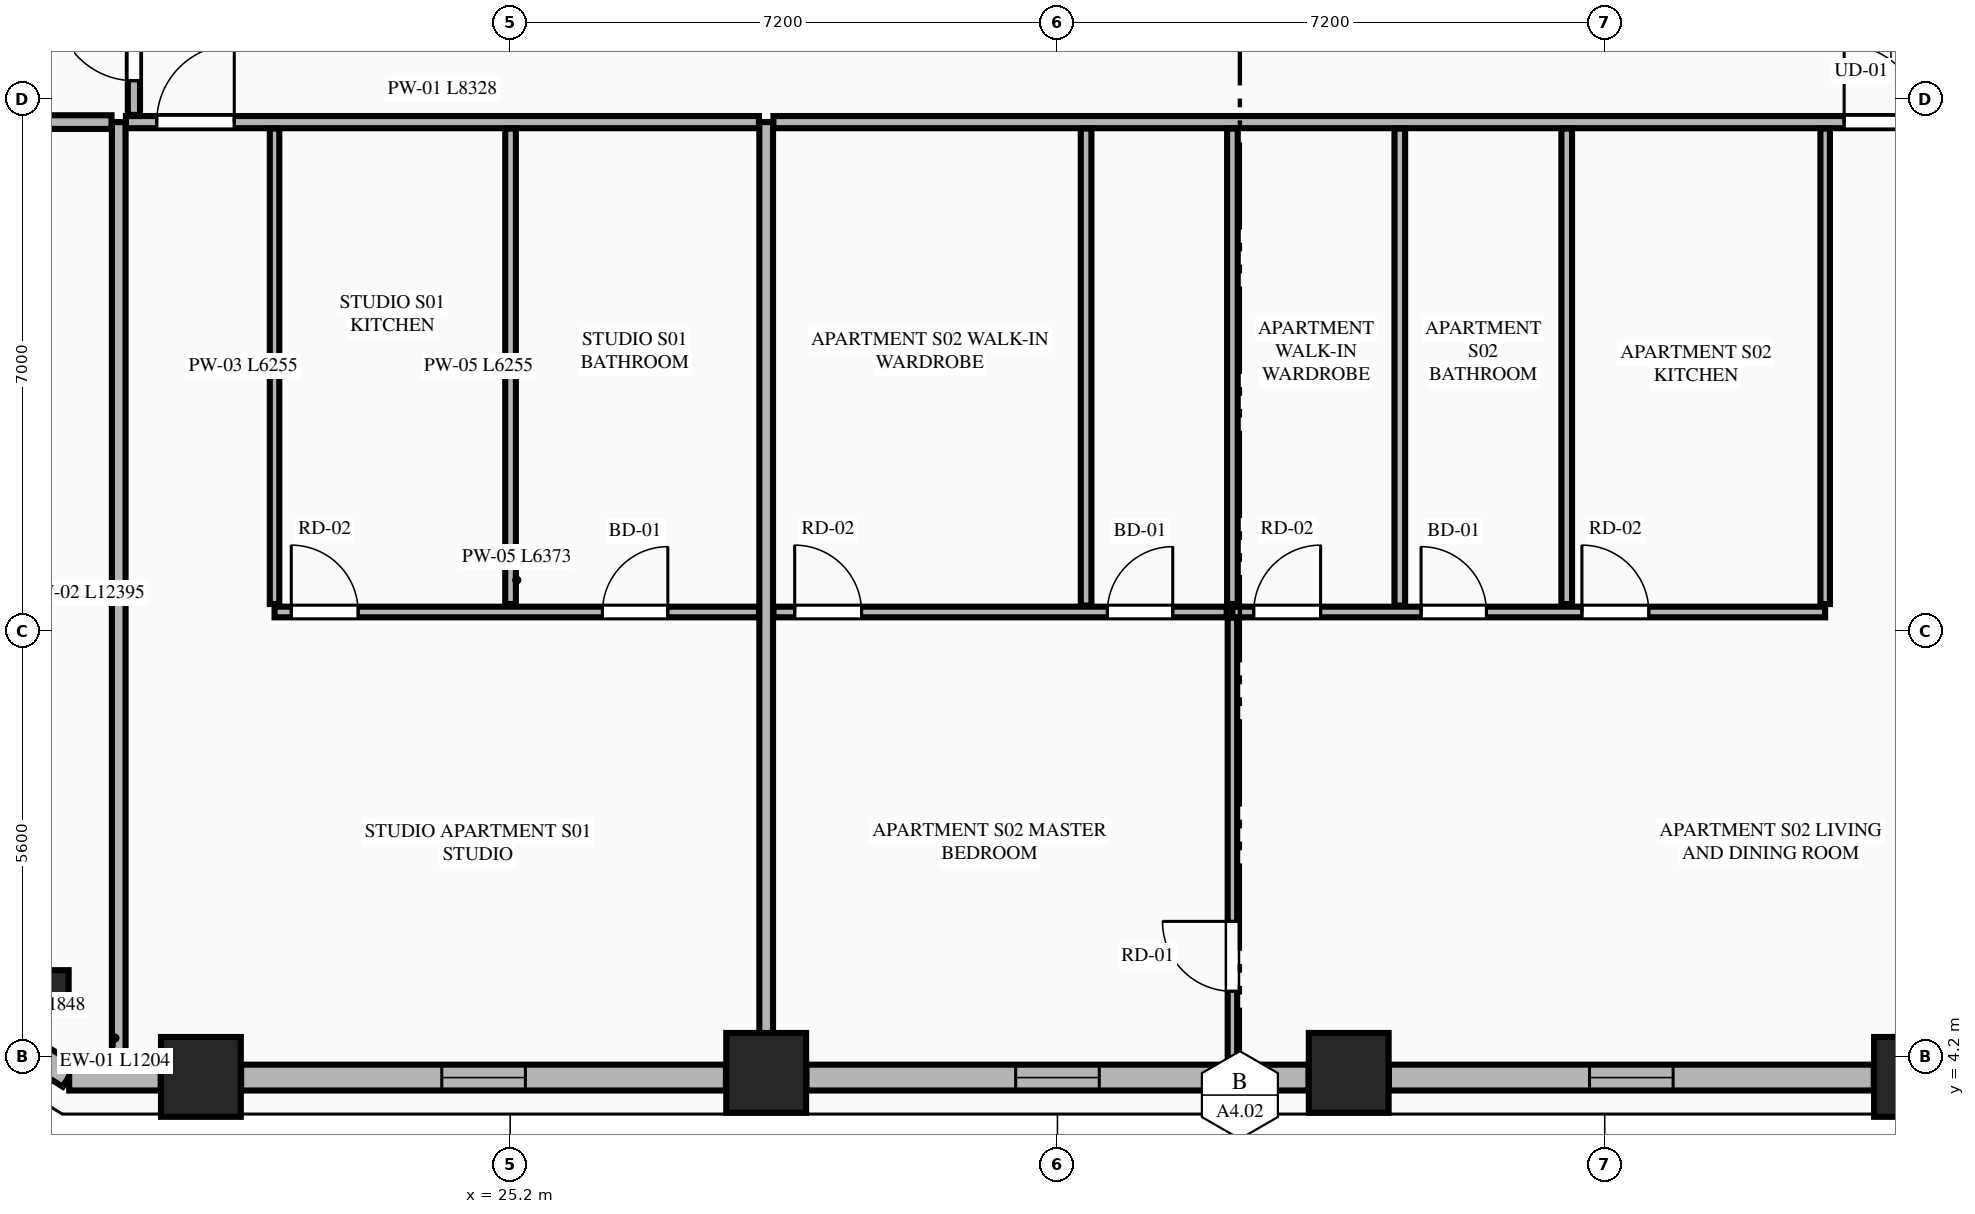
"""IFC4 building model, lengths in metres.
Left out: names, types, materials, properties, quantities, classifications, styles, units other than length and angle.
Written with IfcOpenShell. Run it as: python <this file> out.ifc"""

import sys

from ifc_helpers import new_model, si_unit, direction, frame, frame_2d, origin, origin_2d, place, context, subcontext, project, spatial, rectangle, extrude, element, fill, save


model = new_model("IFC4")
c1 = context("Model", 3, precision=1e-05, world=origin(), true_north=direction((0.0, 1.0)))
c2 = subcontext(c1, "Body", "Model", "MODEL_VIEW")
j1 = project(units=[si_unit("LENGTHUNIT", "METRE"), si_unit("PLANEANGLEUNIT", "RADIAN")], contexts=[c1])
p1 = place(None, origin())
s1 = spatial("IfcSite", under=j1, at=p1, CompositionType="ELEMENT")
p2 = place(p1, origin())
s2 = spatial("IfcBuilding", under=s1, at=p2, CompositionType="ELEMENT")
p3 = place(p2, frame((0.0, 0.0, 126.8)))
s3 = spatial("IfcBuildingStorey", under=s2, at=p3, CompositionType="ELEMENT", Elevation=126.8)
for number, where, z_axis, x_axis in (
    (1, (21.131, 3.939, 0.0), (0.0, 0.0, 1.0), (1.0, 0.0, 0.0)),
    (2, (28.568, 3.992, 0.0), (0.0, 0.0, 1.0), (1.0, 0.0, 0.0)),
    (3, (36.232, 3.992, 0.0), (0.0, 0.0, 1.0), (1.0, 0.0, 0.0)),
    (4, (43.669, 3.939, 0.0), (0.0, 0.0, 1.0), (1.0, 0.0, 0.0)),
):
    element("IfcColumn", number, at=place(p3, frame(where, z_axis=z_axis, x_axis=x_axis)), inside=s3, PredefinedType="COLUMN", context=c2, shape_type="SweptSolid", body=[
        extrude(rectangle(XDim=1.05, YDim=1.05, at=origin_2d()), origin(), (0.0, 0.0, 1.0), 3.55),
    ])
p4 = place(p3, frame((19.141, 5.093, 0.0), z_axis=(0.0, 0.0, 1.0), x_axis=(0.865160173452, -0.501495637342, 0.0)))
e5 = element("IfcColumn", 5, at=p4, inside=s3, PredefinedType="PILASTER", context=c2, shape_type="SweptSolid", body=[
    extrude(rectangle(XDim=0.5, YDim=0.35, at=origin_2d()), origin(), (0.0, 0.0, 1.0), 3.55),
])
p5 = place(p3, frame((17.829, 4.923, 0.0), z_axis=(0.0, 0.0, 1.0), x_axis=(0.851798915137, -0.523868884523, 0.0)))
e6 = element("IfcWall", 6, at=p5, inside=s3, PredefinedType="STANDARD", context=c2, shape_type="SweptSolid", body=[
    extrude(rectangle(XDim=1.848, YDim=0.34, at=frame_2d((0.924, 0.0))), origin(), (0.0, 0.0, 1.0), 3.34),
])
p6 = place(p3, frame((19.398, 3.93, 0.0), z_axis=(0.0, 0.0, 1.0), x_axis=(1.0, 0.0, 0.0)))
e7 = element("IfcWall", 7, at=p6, inside=s3, PredefinedType="STANDARD", context=c2, shape_type="SweptSolid", body=[
    extrude(rectangle(XDim=1.204, YDim=0.34, at=frame_2d((0.602, 0.0))), origin(), (0.0, 0.0, 1.0), 3.34),
])
p7 = place(p3, frame((21.66, 3.93, 0.0), z_axis=(0.0, 0.0, 1.0), x_axis=(1.0, 0.0, 0.0)))
e8 = element("IfcWall", 8, at=p7, inside=s3, PredefinedType="STANDARD", context=c2, shape_type="SweptSolid", body=[
    extrude(rectangle(XDim=6.379, YDim=0.34, at=frame_2d((3.189, 0.0))), origin(), (0.0, 0.0, 1.0), 2.797),
])
p8 = place(p7, frame((2.64, 0.0, 0.75)))
e9 = element("IfcOpeningElement", 9, at=p8, cuts=e8, PredefinedType="OPENING", context=c2, shape_type="SweptSolid", body=[
    extrude(rectangle(XDim=1.1, YDim=1.897, at=frame_2d((0.55, 0.948))), frame((0.0, 0.18, 0.0), z_axis=(0.0, -1.0, 0.0), x_axis=(1.0, 0.0, 0.0)), (0.0, 0.0, 1.0), 0.36),
])
p9 = place(p3, frame((29.097, 3.93, 0.0), z_axis=(0.0, 0.0, 1.0), x_axis=(1.0, 0.0, 0.0)))
e10 = element("IfcWall", 10, at=p9, inside=s3, PredefinedType="STANDARD", context=c2, shape_type="SweptSolid", body=[
    extrude(rectangle(XDim=6.606, YDim=0.34, at=frame_2d((3.303, 0.0))), origin(), (0.0, 0.0, 1.0), 2.797),
])
p10 = place(p9, frame((2.753, 0.0, 0.75)))
e11 = element("IfcOpeningElement", 11, at=p10, cuts=e10, PredefinedType="OPENING", context=c2, shape_type="SweptSolid", body=[
    extrude(rectangle(XDim=1.1, YDim=1.897, at=frame_2d((0.55, 0.948))), frame((0.0, 0.18, 0.0), z_axis=(0.0, -1.0, 0.0), x_axis=(1.0, 0.0, 0.0)), (0.0, 0.0, 1.0), 0.36),
])
p11 = place(p3, frame((36.761, 3.93, 0.0), z_axis=(0.0, 0.0, 1.0), x_axis=(1.0, 0.0, 0.0)))
e12 = element("IfcWall", 12, at=p11, inside=s3, PredefinedType="STANDARD", context=c2, shape_type="SweptSolid", body=[
    extrude(rectangle(XDim=6.379, YDim=0.34, at=frame_2d((3.189, 0.0))), origin(), (0.0, 0.0, 1.0), 2.797),
])
p12 = place(p11, frame((2.639, 0.0, 0.75)))
e13 = element("IfcOpeningElement", 13, at=p12, cuts=e12, PredefinedType="OPENING", context=c2, shape_type="SweptSolid", body=[
    extrude(rectangle(XDim=1.1, YDim=1.897, at=frame_2d((0.55, 0.948))), frame((0.0, 0.18, 0.0), z_axis=(0.0, -1.0, 0.0), x_axis=(1.0, 0.0, 0.0)), (0.0, 0.0, 1.0), 0.36),
])
p13 = place(p3, frame((20.05, 4.105, 0.0), z_axis=(0.0, 0.0, 1.0), x_axis=(0.0, 1.0, 0.0)))
e14 = element("IfcWall", 14, at=p13, inside=s3, PredefinedType="PARTITIONING", context=c2, shape_type="SweptSolid", body=[
    extrude(rectangle(XDim=12.395, YDim=0.18, at=frame_2d((6.198, 0.0))), origin(), (0.0, 0.0, 1.0), 3.34),
])
p14 = place(p3, frame((28.568, 4.105, 0.0), z_axis=(0.0, 0.0, 1.0), x_axis=(0.0, 1.0, 0.0)))
e15 = element("IfcWall", 15, at=p14, inside=s3, PredefinedType="PARTITIONING", context=c2, shape_type="SweptSolid", body=[
    extrude(rectangle(XDim=12.395, YDim=0.18, at=frame_2d((6.198, 0.0))), origin(), (0.0, 0.0, 1.0), 2.722),
])
p15 = place(p3, frame((20.145, 16.5, 0.0), z_axis=(0.0, 0.0, 1.0), x_axis=(1.0, 0.0, 0.0)))
e16 = element("IfcWall", 16, at=p15, inside=s3, PredefinedType="PARTITIONING", context=c2, shape_type="SweptSolid", body=[
    extrude(rectangle(XDim=8.328, YDim=0.16, at=frame_2d((4.164, 0.0))), origin(), (0.0, 0.0, 1.0), 3.34),
])
p16 = place(p15, frame((0.405, 0.0, 0.0)))
e17 = element("IfcOpeningElement", 17, at=p16, cuts=e16, PredefinedType="OPENING", context=c2, shape_type="SweptSolid", body=[
    extrude(rectangle(XDim=1.02, YDim=2.25, at=frame_2d((0.51, 1.125))), frame((0.0, 0.09, 0.0), z_axis=(0.0, -1.0, 0.0), x_axis=(1.0, 0.0, 0.0)), (0.0, 0.0, 1.0), 0.18),
])
p17 = place(p3, frame((22.1, 10.16, 0.0), z_axis=(0.0, 0.0, 1.0), x_axis=(0.0, 1.0, 0.0)))
e18 = element("IfcWall", 18, at=p17, inside=s3, PredefinedType="PARTITIONING", context=c2, shape_type="SweptSolid", body=[
    extrude(rectangle(XDim=6.255, YDim=0.125, at=frame_2d((3.127, 0.0))), origin(), (0.0, 0.0, 1.0), 2.722),
])
p18 = place(p3, frame((22.1, 10.055, 0.0), z_axis=(0.0, 0.0, 1.0), x_axis=(1.0, 0.0, 0.0)))
e19 = element("IfcWall", 19, at=p18, inside=s3, PredefinedType="PLUMBINGWALL", context=c2, shape_type="SweptSolid", body=[
    extrude(rectangle(XDim=6.373, YDim=0.14, at=frame_2d((3.187, 0.0))), origin(), (0.0, 0.0, 1.0), 3.34),
])
p19 = place(p18, frame((4.314, 0.0, 0.0)))
e20 = element("IfcOpeningElement", 20, at=p19, cuts=e19, PredefinedType="OPENING", context=c2, shape_type="SweptSolid", body=[
    extrude(rectangle(XDim=0.86, YDim=2.1, at=frame_2d((0.43, 1.05))), frame((0.0, 0.08, 0.0), z_axis=(0.0, -1.0, 0.0), x_axis=(1.0, 0.0, 0.0)), (0.0, 0.0, 1.0), 0.16),
])
p20 = place(p18, frame((0.22, 0.0, 0.0)))
e21 = element("IfcOpeningElement", 21, at=p20, cuts=e19, PredefinedType="OPENING", context=c2, shape_type="SweptSolid", body=[
    extrude(rectangle(XDim=0.88, YDim=2.15, at=frame_2d((0.44, 1.075))), frame((0.0, 0.08, 0.0), z_axis=(0.0, -1.0, 0.0), x_axis=(1.0, 0.0, 0.0)), (0.0, 0.0, 1.0), 0.16),
])
p21 = place(p3, frame((25.205, 10.16, 0.0), z_axis=(0.0, 0.0, 1.0), x_axis=(0.0, 1.0, 0.0)))
e22 = element("IfcWall", 22, at=p21, inside=s3, PredefinedType="PLUMBINGWALL", context=c2, shape_type="SweptSolid", body=[
    extrude(rectangle(XDim=6.255, YDim=0.14, at=frame_2d((3.127, 0.0))), origin(), (0.0, 0.0, 1.0), 3.34),
])
p22 = place(p3, frame((28.663, 16.5, 0.0), z_axis=(0.0, 0.0, 1.0), x_axis=(1.0, 0.0, 0.0)))
e23 = element("IfcWall", 23, at=p22, inside=s3, PredefinedType="PARTITIONING", context=c2, shape_type="SweptSolid", body=[
    extrude(rectangle(XDim=15.992, YDim=0.16, at=frame_2d((7.996, 0.0))), origin(), (0.0, 0.0, 1.0), 3.34),
])
p23 = place(p22, frame((14.087, 0.0, 0.0)))
e24 = element("IfcOpeningElement", 24, at=p23, cuts=e23, PredefinedType="OPENING", context=c2, shape_type="SweptSolid", body=[
    extrude(rectangle(XDim=1.02, YDim=2.25, at=frame_2d((0.51, 1.125))), frame((0.0, 0.09, 0.0), z_axis=(0.0, -1.0, 0.0), x_axis=(1.0, 0.0, 0.0)), (0.0, 0.0, 1.0), 0.18),
])
p24 = place(p3, frame((42.5, 10.16, 0.0), z_axis=(0.0, 0.0, 1.0), x_axis=(0.0, 1.0, 0.0)))
e25 = element("IfcWall", 25, at=p24, inside=s3, PredefinedType="PARTITIONING", context=c2, shape_type="SweptSolid", body=[
    extrude(rectangle(XDim=6.255, YDim=0.125, at=frame_2d((3.127, 0.0))), origin(), (0.0, 0.0, 1.0), 2.722),
])
p25 = place(p3, frame((34.702, 10.055, 0.0), z_axis=(0.0, 0.0, 1.0), x_axis=(1.0, 0.0, 0.0)))
e26 = element("IfcWall", 26, at=p25, inside=s3, PredefinedType="PLUMBINGWALL", context=c2, shape_type="SweptSolid", body=[
    extrude(rectangle(XDim=7.798, YDim=0.14, at=frame_2d((3.899, 0.0))), origin(), (0.0, 0.0, 1.0), 3.34),
])
p26 = place(p25, frame((0.28, 0.0, 0.0)))
e27 = element("IfcOpeningElement", 27, at=p26, cuts=e26, PredefinedType="OPENING", context=c2, shape_type="SweptSolid", body=[
    extrude(rectangle(XDim=0.88, YDim=2.15, at=frame_2d((0.44, 1.075))), frame((0.0, 0.08, 0.0), z_axis=(0.0, -1.0, 0.0), x_axis=(1.0, 0.0, 0.0)), (0.0, 0.0, 1.0), 0.16),
])
p27 = place(p25, frame((2.482, 0.0, 0.0)))
e28 = element("IfcOpeningElement", 28, at=p27, cuts=e26, PredefinedType="OPENING", context=c2, shape_type="SweptSolid", body=[
    extrude(rectangle(XDim=0.86, YDim=2.1, at=frame_2d((0.43, 1.05))), frame((0.0, 0.08, 0.0), z_axis=(0.0, -1.0, 0.0), x_axis=(1.0, 0.0, 0.0)), (0.0, 0.0, 1.0), 0.16),
])
p28 = place(p25, frame((4.598, 0.0, 0.0)))
e29 = element("IfcOpeningElement", 29, at=p28, cuts=e26, PredefinedType="OPENING", context=c2, shape_type="SweptSolid", body=[
    extrude(rectangle(XDim=0.88, YDim=2.15, at=frame_2d((0.44, 1.075))), frame((0.0, 0.08, 0.0), z_axis=(0.0, -1.0, 0.0), x_axis=(1.0, 0.0, 0.0)), (0.0, 0.0, 1.0), 0.16),
])
p29 = place(p3, frame((28.663, 10.055, 0.0), z_axis=(0.0, 0.0, 1.0), x_axis=(1.0, 0.0, 0.0)))
e30 = element("IfcWall", 30, at=p29, inside=s3, PredefinedType="PLUMBINGWALL", context=c2, shape_type="SweptSolid", body=[
    extrude(rectangle(XDim=5.964, YDim=0.14, at=frame_2d((2.982, 0.0))), origin(), (0.0, 0.0, 1.0), 3.34),
])
p30 = place(p29, frame((0.28, 0.0, 0.0)))
e31 = element("IfcOpeningElement", 31, at=p30, cuts=e30, PredefinedType="OPENING", context=c2, shape_type="SweptSolid", body=[
    extrude(rectangle(XDim=0.88, YDim=2.15, at=frame_2d((0.44, 1.075))), frame((0.0, 0.08, 0.0), z_axis=(0.0, -1.0, 0.0), x_axis=(1.0, 0.0, 0.0)), (0.0, 0.0, 1.0), 0.16),
])
p31 = place(p29, frame((4.394, 0.0, 0.0)))
e32 = element("IfcOpeningElement", 32, at=p31, cuts=e30, PredefinedType="OPENING", context=c2, shape_type="SweptSolid", body=[
    extrude(rectangle(XDim=0.86, YDim=2.1, at=frame_2d((0.43, 1.05))), frame((0.0, 0.08, 0.0), z_axis=(0.0, -1.0, 0.0), x_axis=(1.0, 0.0, 0.0)), (0.0, 0.0, 1.0), 0.16),
])
for number, where, z_axis, x_axis in (
    (33, (39.1, 10.16, 0.0), (0.0, 0.0, 1.0), (0.0, 1.0, 0.0)),
    (34, (34.702, 10.16, 0.0), (0.0, 0.0, 1.0), (0.0, 1.0, 0.0)),
):
    element("IfcWall", number, at=place(p3, frame(where, z_axis=z_axis, x_axis=x_axis)), inside=s3, PredefinedType="PLUMBINGWALL", context=c2, shape_type="SweptSolid", body=[
        extrude(rectangle(XDim=6.255, YDim=0.14, at=frame_2d((3.127, 0.0))), origin(), (0.0, 0.0, 1.0), 3.34),
    ])
p32 = place(p3, frame((34.702, 4.015, 0.0), z_axis=(0.0, 0.0, 1.0), x_axis=(0.0, 1.0, 0.0)))
e35 = element("IfcWall", 35, at=p32, inside=s3, PredefinedType="PARTITIONING", context=c2, shape_type="SweptSolid", body=[
    extrude(rectangle(XDim=5.965, YDim=0.125, at=frame_2d((2.982, 0.0))), origin(), (0.0, 0.0, 1.0), 3.34),
])
p33 = place(p32, frame((1.05, 0.0, 0.0)))
e36 = element("IfcOpeningElement", 36, at=p33, cuts=e35, PredefinedType="OPENING", context=c2, shape_type="SweptSolid", body=[
    extrude(rectangle(XDim=0.92, YDim=2.15, at=frame_2d((0.46, 1.075))), frame((0.0, 0.073, 0.0), z_axis=(0.0, -1.0, 0.0), x_axis=(1.0, 0.0, 0.0)), (0.0, 0.0, 1.0), 0.145),
])
for number, where, z_axis, x_axis in (
    (37, (36.904, 10.14, 0.0), (0.0, 0.0, 1.0), (0.0, 1.0, 0.0)),
    (38, (32.777, 10.14, 0.0), (0.0, 0.0, 1.0), (0.0, 1.0, 0.0)),
):
    element("IfcWall", number, at=place(p3, frame(where, z_axis=z_axis, x_axis=x_axis)), inside=s3, PredefinedType="PLUMBINGWALL", context=c2, shape_type="SweptSolid", body=[
        extrude(rectangle(XDim=6.275, YDim=0.14, at=frame_2d((3.138, 0.0))), origin(), (0.0, 0.0, 1.0), 3.34),
    ])
p34 = place(p3, frame((12.185, 16.5, 0.0), z_axis=(0.0, 0.0, 1.0), x_axis=(1.0, 0.0, 0.0)))
e39 = element("IfcWall", 39, at=p34, inside=s3, PredefinedType="PARTITIONING", context=c2, shape_type="SweptSolid", body=[
    extrude(rectangle(XDim=7.77, YDim=0.18, at=frame_2d((3.885, 0.0))), origin(), (0.0, 0.0, 1.0), 3.34),
])
p35 = place(p3, frame((20.25, 16.595, 0.0), z_axis=(0.0, 0.0, 1.0), x_axis=(0.0, 1.0, 0.0)))
e40 = element("IfcWall", 40, at=p35, inside=s3, PredefinedType="PARTITIONING", context=c2, shape_type="SweptSolid", body=[
    extrude(rectangle(XDim=18.61, YDim=0.16, at=frame_2d((9.305, 0.0))), origin(), (0.0, 0.0, 1.0), 3.34),
])
p36 = place(p35, frame((0.45, 0.0, 0.0)))
e41 = element("IfcOpeningElement", 41, at=p36, cuts=e40, PredefinedType="OPENING", context=c2, shape_type="SweptSolid", body=[
    extrude(rectangle(XDim=1.02, YDim=2.25, at=frame_2d((0.51, 1.125))), frame((0.0, 0.09, 0.0), z_axis=(0.0, -1.0, 0.0), x_axis=(1.0, 0.0, 0.0)), (0.0, 0.0, 1.0), 0.18),
])
p37 = place(p8, origin())
e42 = element("IfcWindow", 42, at=p37, inside=s3, PartitioningType="SINGLE_PANEL", PredefinedType="WINDOW", context=c2, shape_type="SweptSolid", body=[
    extrude(rectangle(XDim=1.1, YDim=1.897, at=frame_2d((0.55, 0.948))), frame((0.0, 0.03, 0.0), z_axis=(0.0, -1.0, 0.0), x_axis=(1.0, 0.0, 0.0)), (0.0, 0.0, 1.0), 0.06),
])
fill(e9, e42)
p38 = place(p10, origin())
e43 = element("IfcWindow", 43, at=p38, inside=s3, PartitioningType="SINGLE_PANEL", PredefinedType="WINDOW", context=c2, shape_type="SweptSolid", body=[
    extrude(rectangle(XDim=1.1, YDim=1.897, at=frame_2d((0.55, 0.948))), frame((0.0, 0.03, 0.0), z_axis=(0.0, -1.0, 0.0), x_axis=(1.0, 0.0, 0.0)), (0.0, 0.0, 1.0), 0.06),
])
fill(e11, e43)
p39 = place(p12, origin())
e44 = element("IfcWindow", 44, at=p39, inside=s3, PartitioningType="SINGLE_PANEL", PredefinedType="WINDOW", context=c2, shape_type="SweptSolid", body=[
    extrude(rectangle(XDim=1.1, YDim=1.897, at=frame_2d((0.55, 0.948))), frame((0.0, 0.03, 0.0), z_axis=(0.0, -1.0, 0.0), x_axis=(1.0, 0.0, 0.0)), (0.0, 0.0, 1.0), 0.06),
])
fill(e13, e44)
p40 = place(p19, origin())
e45 = element("IfcDoor", 45, at=p40, inside=s3, OperationType="SINGLE_SWING_RIGHT", PredefinedType="DOOR", context=c2, shape_type="SweptSolid", body=[
    extrude(rectangle(XDim=0.86, YDim=2.1, at=frame_2d((0.43, 1.05))), frame((0.0, 0.025, 0.0), z_axis=(0.0, -1.0, 0.0), x_axis=(1.0, 0.0, 0.0)), (0.0, 0.0, 1.0), 0.05),
])
fill(e20, e45)
p41 = place(p16, origin())
e46 = element("IfcDoor", 46, at=p41, inside=s3, OperationType="SINGLE_SWING_RIGHT", PredefinedType="DOOR", context=c2, shape_type="SweptSolid", body=[
    extrude(rectangle(XDim=1.02, YDim=2.25, at=frame_2d((0.51, 1.125))), frame((0.0, 0.025, 0.0), z_axis=(0.0, -1.0, 0.0), x_axis=(1.0, 0.0, 0.0)), (0.0, 0.0, 1.0), 0.05),
])
fill(e17, e46)
p42 = place(p20, origin())
e47 = element("IfcDoor", 47, at=p42, inside=s3, OperationType="SINGLE_SWING_LEFT", PredefinedType="DOOR", context=c2, shape_type="SweptSolid", body=[
    extrude(rectangle(XDim=0.88, YDim=2.15, at=frame_2d((0.44, 1.075))), frame((0.0, 0.025, 0.0), z_axis=(0.0, -1.0, 0.0), x_axis=(1.0, 0.0, 0.0)), (0.0, 0.0, 1.0), 0.05),
])
fill(e21, e47)
p43 = place(p26, origin())
e48 = element("IfcDoor", 48, at=p43, inside=s3, OperationType="SINGLE_SWING_RIGHT", PredefinedType="DOOR", context=c2, shape_type="SweptSolid", body=[
    extrude(rectangle(XDim=0.88, YDim=2.15, at=frame_2d((0.44, 1.075))), frame((0.0, 0.025, 0.0), z_axis=(0.0, -1.0, 0.0), x_axis=(1.0, 0.0, 0.0)), (0.0, 0.0, 1.0), 0.05),
])
fill(e27, e48)
p44 = place(p27, origin())
e49 = element("IfcDoor", 49, at=p44, inside=s3, OperationType="SINGLE_SWING_LEFT", PredefinedType="DOOR", context=c2, shape_type="SweptSolid", body=[
    extrude(rectangle(XDim=0.86, YDim=2.1, at=frame_2d((0.43, 1.05))), frame((0.0, 0.025, 0.0), z_axis=(0.0, -1.0, 0.0), x_axis=(1.0, 0.0, 0.0)), (0.0, 0.0, 1.0), 0.05),
])
fill(e28, e49)
p45 = place(p30, origin())
e50 = element("IfcDoor", 50, at=p45, inside=s3, OperationType="SINGLE_SWING_LEFT", PredefinedType="DOOR", context=c2, shape_type="SweptSolid", body=[
    extrude(rectangle(XDim=0.88, YDim=2.15, at=frame_2d((0.44, 1.075))), frame((0.0, 0.025, 0.0), z_axis=(0.0, -1.0, 0.0), x_axis=(1.0, 0.0, 0.0)), (0.0, 0.0, 1.0), 0.05),
])
fill(e31, e50)
p46 = place(p31, origin())
e51 = element("IfcDoor", 51, at=p46, inside=s3, OperationType="SINGLE_SWING_RIGHT", PredefinedType="DOOR", context=c2, shape_type="SweptSolid", body=[
    extrude(rectangle(XDim=0.86, YDim=2.1, at=frame_2d((0.43, 1.05))), frame((0.0, 0.025, 0.0), z_axis=(0.0, -1.0, 0.0), x_axis=(1.0, 0.0, 0.0)), (0.0, 0.0, 1.0), 0.05),
])
fill(e32, e51)
p47 = place(p23, origin())
e52 = element("IfcDoor", 52, at=p47, inside=s3, OperationType="SINGLE_SWING_LEFT", PredefinedType="DOOR", context=c2, shape_type="SweptSolid", body=[
    extrude(rectangle(XDim=1.02, YDim=2.25, at=frame_2d((0.51, 1.125))), frame((0.0, 0.025, 0.0), z_axis=(0.0, -1.0, 0.0), x_axis=(1.0, 0.0, 0.0)), (0.0, 0.0, 1.0), 0.05),
])
fill(e24, e52)
p48 = place(p28, origin())
e53 = element("IfcDoor", 53, at=p48, inside=s3, OperationType="SINGLE_SWING_LEFT", PredefinedType="DOOR", context=c2, shape_type="SweptSolid", body=[
    extrude(rectangle(XDim=0.88, YDim=2.15, at=frame_2d((0.44, 1.075))), frame((0.0, 0.025, 0.0), z_axis=(0.0, -1.0, 0.0), x_axis=(1.0, 0.0, 0.0)), (0.0, 0.0, 1.0), 0.05),
])
fill(e29, e53)
p49 = place(p33, origin())
e54 = element("IfcDoor", 54, at=p49, inside=s3, OperationType="SINGLE_SWING_RIGHT", PredefinedType="DOOR", context=c2, shape_type="SweptSolid", body=[
    extrude(rectangle(XDim=0.92, YDim=2.15, at=frame_2d((0.46, 1.075))), frame((0.0, 0.025, 0.0), z_axis=(0.0, -1.0, 0.0), x_axis=(1.0, 0.0, 0.0)), (0.0, 0.0, 1.0), 0.05),
])
fill(e36, e54)
p50 = place(p36, origin())
e55 = element("IfcDoor", 55, at=p50, inside=s3, OperationType="SINGLE_SWING_RIGHT", PredefinedType="DOOR", context=c2, shape_type="SweptSolid", body=[
    extrude(rectangle(XDim=1.02, YDim=2.25, at=frame_2d((0.51, 1.125))), frame((0.0, 0.025, 0.0), z_axis=(0.0, -1.0, 0.0), x_axis=(1.0, 0.0, 0.0)), (0.0, 0.0, 1.0), 0.05),
])
fill(e41, e55)
save(model, sys.argv[1])
